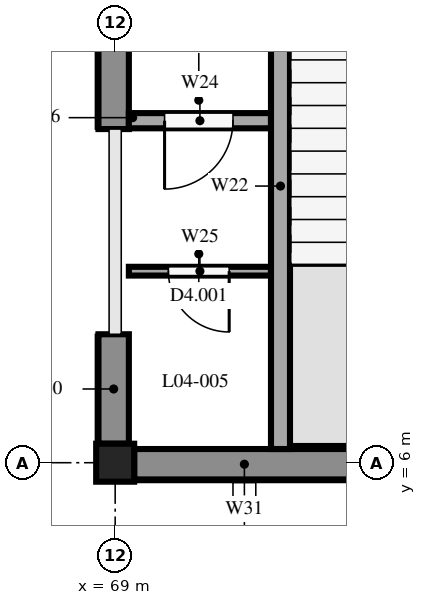
"""IFC4 building model, lengths in metres.
Left out: names, types, materials, properties, quantities, classifications, styles, units other than length and angle.
Written with IfcOpenShell. Run it as: python <this file> out.ifc"""

import sys

from ifc_helpers import new_model, si_unit, direction, frame, frame_2d, origin, origin_2d, place, context, subcontext, project, spatial, rectangle, extrude, element, fill, save


model = new_model("IFC4")
c1 = context("Model", 3, precision=1e-05, world=origin(), true_north=direction((0.0, 1.0)))
c2 = subcontext(c1, "Body", "Model", "MODEL_VIEW")
j1 = project(units=[si_unit("LENGTHUNIT", "METRE"), si_unit("PLANEANGLEUNIT", "RADIAN")], contexts=[c1])
p1 = place(None, origin())
s1 = spatial("IfcSite", under=j1, at=p1, CompositionType="ELEMENT")
p2 = place(p1, origin())
s2 = spatial("IfcBuilding", under=s1, at=p2, CompositionType="ELEMENT")
p3 = place(p2, frame((0.0, 0.0, 15.3)))
s3 = spatial("IfcBuildingStorey", under=s2, at=p3, CompositionType="ELEMENT", Elevation=15.3)
p4 = place(p3, frame((69.0, 6.0, 0.0), z_axis=(0.0, 0.0, 1.0), x_axis=(1.0, 0.0, 0.0)))
e1 = element("IfcColumn", 1, at=p4, inside=s3, PredefinedType="COLUMN", context=c2, shape_type="SweptSolid", body=[
    extrude(rectangle(XDim=0.5, YDim=0.5, at=origin_2d()), origin(), (0.0, 0.0, 1.0), 3.3),
])
p5 = place(p3, frame((68.98, 6.25, 0.0), z_axis=(0.0, 0.0, 1.0), x_axis=(0.0, 1.0, 0.0)))
e2 = element("IfcWall", 2, at=p5, inside=s3, PredefinedType="STANDARD", context=c2, shape_type="SweptSolid", body=[
    extrude(rectangle(XDim=1.44, YDim=0.4, at=frame_2d((0.72, 0.0))), origin(), (0.0, 0.0, 1.0), 2.75),
])
p6 = place(p3, frame((68.98, 10.39, 0.0), z_axis=(0.0, 0.0, 1.0), x_axis=(0.0, 1.0, 0.0)))
e3 = element("IfcWall", 3, at=p6, inside=s3, PredefinedType="STANDARD", context=c2, shape_type="SweptSolid", body=[
    extrude(rectangle(XDim=4.36, YDim=0.4, at=frame_2d((2.18, 0.0))), origin(), (0.0, 0.0, 1.0), 2.75),
])
p7 = place(p3, frame((72.15, 5.98, 0.0), z_axis=(0.0, 0.0, 1.0), x_axis=(-1.0, 0.0, 0.0)))
e4 = element("IfcWall", 4, at=p7, inside=s3, PredefinedType="STANDARD", context=c2, shape_type="SweptSolid", body=[
    extrude(rectangle(XDim=2.9, YDim=0.4, at=frame_2d((1.45, 0.0))), origin(), (0.0, 0.0, 1.0), 2.8),
])
p8 = place(p3, frame((71.175, 6.18, 0.0), z_axis=(0.0, 0.0, 1.0), x_axis=(0.0, 1.0, 0.0)))
e5 = element("IfcWall", 5, at=p8, inside=s3, PredefinedType="SOLIDWALL", context=c2, shape_type="SweptSolid", body=[
    extrude(rectangle(XDim=5.72, YDim=0.25, at=frame_2d((2.86, 0.0))), origin(), (0.0, 0.0, 1.0), 3.3),
])
p9 = place(p3, frame((71.05, 10.5, 0.0), z_axis=(0.0, 0.0, 1.0), x_axis=(-1.0, 0.0, 0.0)))
e6 = element("IfcWall", 6, at=p9, inside=s3, PredefinedType="SOLIDWALL", context=c2, shape_type="SweptSolid", body=[
    extrude(rectangle(XDim=1.87, YDim=0.2, at=frame_2d((0.935, 0.0))), origin(), (0.0, 0.0, 1.0), 3.3),
])
p10 = place(p9, frame((0.5, 0.0, 0.0)))
e7 = element("IfcOpeningElement", 7, at=p10, cuts=e6, PredefinedType="OPENING", context=c2, shape_type="SweptSolid", body=[
    extrude(rectangle(XDim=0.9, YDim=2.1, at=frame_2d((0.45, 1.05))), frame((0.0, 0.11, 0.0), z_axis=(0.0, -1.0, 0.0), x_axis=(1.0, 0.0, 0.0)), (0.0, 0.0, 1.0), 0.22),
])
p11 = place(p3, frame((71.05, 8.52, 0.0), z_axis=(0.0, 0.0, 1.0), x_axis=(-1.0, 0.0, 0.0)))
e8 = element("IfcWall", 8, at=p11, inside=s3, PredefinedType="PARTITIONING", context=c2, shape_type="SweptSolid", body=[
    extrude(rectangle(XDim=1.87, YDim=0.115, at=frame_2d((0.935, 0.0))), origin(), (0.0, 0.0, 1.0), 3.3),
])
p12 = place(p11, frame((0.55, 0.0, 0.0)))
e9 = element("IfcOpeningElement", 9, at=p12, cuts=e8, PredefinedType="OPENING", context=c2, shape_type="SweptSolid", body=[
    extrude(rectangle(XDim=0.8, YDim=2.1, at=frame_2d((0.4, 1.05))), frame((0.0, 0.067, 0.0), z_axis=(0.0, -1.0, 0.0), x_axis=(1.0, 0.0, 0.0)), (0.0, 0.0, 1.0), 0.135),
])
p13 = place(p10, origin())
e10 = element("IfcDoor", 10, at=p13, inside=s3, OperationType="SINGLE_SWING_RIGHT", PredefinedType="DOOR", context=c2, shape_type="SweptSolid", body=[
    extrude(rectangle(XDim=0.9, YDim=2.1, at=frame_2d((0.45, 1.05))), frame((0.0, 0.025, 0.0), z_axis=(0.0, -1.0, 0.0), x_axis=(1.0, 0.0, 0.0)), (0.0, 0.0, 1.0), 0.05),
])
fill(e7, e10)
p14 = place(p12, origin())
e11 = element("IfcDoor", 11, at=p14, inside=s3, OperationType="SINGLE_SWING_LEFT", PredefinedType="DOOR", context=c2, shape_type="SweptSolid", body=[
    extrude(rectangle(XDim=0.8, YDim=2.1, at=frame_2d((0.4, 1.05))), frame((0.0, 0.025, 0.0), z_axis=(0.0, -1.0, 0.0), x_axis=(1.0, 0.0, 0.0)), (0.0, 0.0, 1.0), 0.05),
])
fill(e9, e11)
save(model, sys.argv[1])
